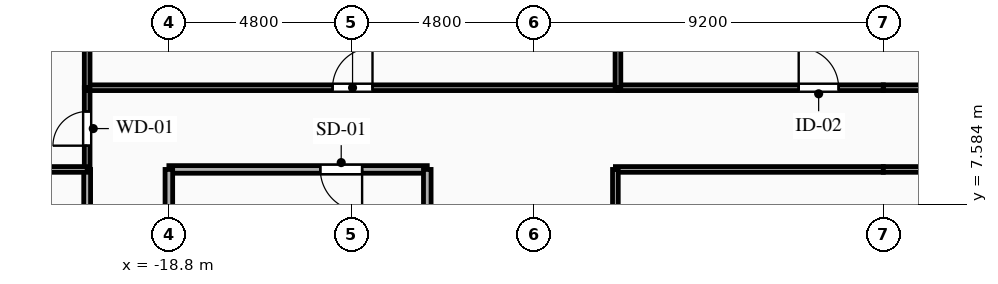
"""IFC4 building model, lengths in metres.
Left out: names, types, materials, properties, quantities, classifications, styles, units other than length and angle.
Written with IfcOpenShell. Run it as: python <this file> out.ifc"""

import sys

from ifc_helpers import new_model, si_unit, direction, frame, frame_2d, origin, place, context, subcontext, project, spatial, rectangle, extrude, element, fill, save


model = new_model("IFC4")
c1 = context("Model", 3, precision=1e-05, world=origin(), true_north=direction((0.0, 1.0)))
c2 = subcontext(c1, "Body", "Model", "MODEL_VIEW")
j1 = project(units=[si_unit("LENGTHUNIT", "METRE"), si_unit("PLANEANGLEUNIT", "RADIAN")], contexts=[c1])
p1 = place(None, origin())
s1 = spatial("IfcSite", under=j1, at=p1, CompositionType="ELEMENT")
p2 = place(p1, origin())
s2 = spatial("IfcBuilding", under=s1, at=p2, CompositionType="ELEMENT")
p3 = place(p2, frame((0.0, 0.0, 151.1)))
s3 = spatial("IfcBuildingStorey", under=s2, at=p3, CompositionType="ELEMENT", Elevation=151.1)
p4 = place(p3, frame((-12.0, 8.5, 0.0), z_axis=(0.0, 0.0, 1.0), x_axis=(-1.0, 0.0, 0.0)))
e1 = element("IfcWall", 1, at=p4, inside=s3, PredefinedType="PARTITIONING", context=c2, shape_type="SweptSolid", body=[
    extrude(rectangle(XDim=6.8, YDim=0.2, at=frame_2d((3.4, 0.0))), origin(), (0.0, 0.0, 1.0), 3.04),
])
p5 = place(p4, frame((1.715, 0.0, 0.0)))
e2 = element("IfcOpeningElement", 2, at=p5, cuts=e1, PredefinedType="OPENING", context=c2, shape_type="SweptSolid", body=[
    extrude(rectangle(XDim=1.1, YDim=2.15, at=frame_2d((0.55, 1.075))), frame((0.0, 0.11, 0.0), z_axis=(0.0, -1.0, 0.0), x_axis=(1.0, 0.0, 0.0)), (0.0, 0.0, 1.0), 0.22),
])
p6 = place(p3, frame((-18.8, 8.5, 0.0), z_axis=(0.0, 0.0, 1.0), x_axis=(0.0, -1.0, 0.0)))
e3 = element("IfcWall", 3, at=p6, inside=s3, PredefinedType="PARTITIONING", context=c2, shape_type="SweptSolid", body=[
    extrude(rectangle(XDim=2.9, YDim=0.2, at=frame_2d((1.45, 0.0))), origin(), (0.0, 0.0, 1.0), 2.525),
])
p7 = place(p3, frame((-12.0, 5.6, 0.0), z_axis=(0.0, 0.0, 1.0), x_axis=(0.0, 1.0, 0.0)))
e4 = element("IfcWall", 4, at=p7, inside=s3, PredefinedType="PARTITIONING", context=c2, shape_type="SweptSolid", body=[
    extrude(rectangle(XDim=2.9, YDim=0.2, at=frame_2d((1.45, 0.0))), origin(), (0.0, 0.0, 1.0), 3.04),
])
p8 = place(p3, frame((-20.95, 8.5, 0.0), z_axis=(0.0, 0.0, 1.0), x_axis=(0.0, 1.0, 0.0)))
e5 = element("IfcWall", 5, at=p8, inside=s3, PredefinedType="PARTITIONING", context=c2, shape_type="SweptSolid", body=[
    extrude(rectangle(XDim=2.15, YDim=0.15, at=frame_2d((1.075, 0.0))), origin(), (0.0, 0.0, 1.0), 3.04),
])
p9 = place(p8, frame((0.625, 0.0, 0.0)))
e6 = element("IfcOpeningElement", 6, at=p9, cuts=e5, PredefinedType="OPENING", context=c2, shape_type="SweptSolid", body=[
    extrude(rectangle(XDim=0.9, YDim=2.1, at=frame_2d((0.45, 1.05))), frame((0.0, 0.085, 0.0), z_axis=(0.0, -1.0, 0.0), x_axis=(1.0, 0.0, 0.0)), (0.0, 0.0, 1.0), 0.17),
])
p10 = place(p3, frame((-20.95, 10.65, 0.0), z_axis=(0.0, 0.0, 1.0), x_axis=(1.0, 0.0, 0.0)))
e7 = element("IfcWall", 7, at=p10, inside=s3, PredefinedType="PARTITIONING", context=c2, shape_type="SweptSolid", body=[
    extrude(rectangle(XDim=13.967, YDim=0.15, at=frame_2d((6.983, 0.0))), origin(), (0.0, 0.0, 1.0), 3.04),
])
p11 = place(p10, frame((6.458, 0.0, 0.0)))
e8 = element("IfcOpeningElement", 8, at=p11, cuts=e7, PredefinedType="OPENING", context=c2, shape_type="SweptSolid", body=[
    extrude(rectangle(XDim=1.05, YDim=2.15, at=frame_2d((0.525, 1.075))), frame((0.0, 0.085, 0.0), z_axis=(0.0, -1.0, 0.0), x_axis=(1.0, 0.0, 0.0)), (0.0, 0.0, 1.0), 0.17),
])
p12 = place(p3, frame((-6.983, 10.65, 0.0), z_axis=(0.0, 0.0, 1.0), x_axis=(1.0, 0.0, 0.0)))
e9 = element("IfcWall", 9, at=p12, inside=s3, PredefinedType="PARTITIONING", context=c2, shape_type="SweptSolid", body=[
    extrude(rectangle(XDim=6.983, YDim=0.15, at=frame_2d((3.491, 0.0))), origin(), (0.0, 0.0, 1.0), 3.04),
])
p13 = place(p12, frame((4.756, 0.0, 0.0)))
e10 = element("IfcOpeningElement", 10, at=p13, cuts=e9, PredefinedType="OPENING", context=c2, shape_type="SweptSolid", body=[
    extrude(rectangle(XDim=1.05, YDim=2.15, at=frame_2d((0.525, 1.075))), frame((0.0, 0.085, 0.0), z_axis=(0.0, -1.0, 0.0), x_axis=(1.0, 0.0, 0.0)), (0.0, 0.0, 1.0), 0.17),
])
p14 = place(p3, frame((0.0, 8.5, 0.0), z_axis=(0.0, 0.0, 1.0), x_axis=(-1.0, 0.0, 0.0)))
e11 = element("IfcWall", 11, at=p14, inside=s3, PredefinedType="PARTITIONING", context=c2, shape_type="SweptSolid", body=[
    extrude(rectangle(XDim=7.05, YDim=0.15, at=frame_2d((3.525, 0.0))), origin(), (0.0, 0.0, 1.0), 3.04),
])
p15 = place(p3, frame((0.0, 10.65, 0.0), z_axis=(0.0, 0.0, 1.0), x_axis=(1.0, 0.0, 0.0)))
e12 = element("IfcWall", 12, at=p15, inside=s3, PredefinedType="PARTITIONING", context=c2, shape_type="SweptSolid", body=[
    extrude(rectangle(XDim=6.983, YDim=0.15, at=frame_2d((3.491, 0.0))), origin(), (0.0, 0.0, 1.0), 3.04),
])
p16 = place(p3, frame((7.05, 8.5, 0.0), z_axis=(0.0, 0.0, 1.0), x_axis=(-1.0, 0.0, 0.0)))
e13 = element("IfcWall", 13, at=p16, inside=s3, PredefinedType="PARTITIONING", context=c2, shape_type="SweptSolid", body=[
    extrude(rectangle(XDim=7.05, YDim=0.15, at=frame_2d((3.525, 0.0))), origin(), (0.0, 0.0, 1.0), 3.04),
])
p17 = place(p3, frame((-20.95, -5.6, 0.0), z_axis=(0.0, 0.0, 1.0), x_axis=(0.0, 1.0, 0.0)))
e14 = element("IfcWall", 14, at=p17, inside=s3, PredefinedType="PARTITIONING", context=c2, shape_type="SweptSolid", body=[
    extrude(rectangle(XDim=14.1, YDim=0.18, at=frame_2d((7.05, 0.0))), origin(), (0.0, 0.0, 1.0), 3.04),
])
p18 = place(p17, frame((5.058, 0.0, 0.0)))
e15 = element("IfcOpeningElement", 15, at=p18, cuts=e14, PredefinedType="OPENING", context=c2, shape_type="SweptSolid", body=[
    extrude(rectangle(XDim=1.0, YDim=2.15, at=frame_2d((0.5, 1.075))), frame((0.0, 0.1, 0.0), z_axis=(0.0, -1.0, 0.0), x_axis=(1.0, 0.0, 0.0)), (0.0, 0.0, 1.0), 0.2),
])
p19 = place(p3, frame((-7.05, 8.5, 0.0), z_axis=(0.0, 0.0, 1.0), x_axis=(0.0, -1.0, 0.0)))
e16 = element("IfcWall", 16, at=p19, inside=s3, PredefinedType="PARTITIONING", context=c2, shape_type="SweptSolid", body=[
    extrude(rectangle(XDim=9.3, YDim=0.15, at=frame_2d((4.65, 0.0))), origin(), (0.0, 0.0, 1.0), 3.04),
])
p20 = place(p3, frame((-23.6, 8.5, 0.0), z_axis=(0.0, 0.0, 1.0), x_axis=(1.0, 0.0, 0.0)))
e17 = element("IfcWall", 17, at=p20, inside=s3, PredefinedType="PARTITIONING", context=c2, shape_type="SweptSolid", body=[
    extrude(rectangle(XDim=2.65, YDim=0.15, at=frame_2d((1.325, 0.0))), origin(), (0.0, 0.0, 1.0), 3.04),
])
p21 = place(p20, frame((0.635, 0.0, 0.0)))
e18 = element("IfcOpeningElement", 18, at=p21, cuts=e17, PredefinedType="OPENING", context=c2, shape_type="SweptSolid", body=[
    extrude(rectangle(XDim=1.05, YDim=2.15, at=frame_2d((0.525, 1.075))), frame((0.0, 0.085, 0.0), z_axis=(0.0, -1.0, 0.0), x_axis=(1.0, 0.0, 0.0)), (0.0, 0.0, 1.0), 0.17),
])
for number, where, z_axis, x_axis in (
    (19, (-20.95, 20.4, 0.0), (0.0, 0.0, 1.0), (0.0, -1.0, 0.0)),
    (20, (-6.983, 20.4, 0.0), (0.0, 0.0, 1.0), (0.0, -1.0, 0.0)),
):
    element("IfcWall", number, at=place(p3, frame(where, z_axis=z_axis, x_axis=x_axis)), inside=s3, PredefinedType="PARTITIONING", context=c2, shape_type="SweptSolid", body=[
        extrude(rectangle(XDim=9.75, YDim=0.15, at=frame_2d((4.875, 0.0))), origin(), (0.0, 0.0, 1.0), 3.04),
    ])
p22 = place(p5, origin())
e21 = element("IfcDoor", 21, at=p22, inside=s3, OperationType="SINGLE_SWING_LEFT", PredefinedType="DOOR", context=c2, shape_type="SweptSolid", body=[
    extrude(rectangle(XDim=1.1, YDim=2.15, at=frame_2d((0.55, 1.075))), frame((0.0, 0.025, 0.0), z_axis=(0.0, -1.0, 0.0), x_axis=(1.0, 0.0, 0.0)), (0.0, 0.0, 1.0), 0.05),
])
fill(e2, e21)
p23 = place(p9, origin())
e22 = element("IfcDoor", 22, at=p23, inside=s3, OperationType="SINGLE_SWING_LEFT", PredefinedType="DOOR", context=c2, shape_type="SweptSolid", body=[
    extrude(rectangle(XDim=0.9, YDim=2.1, at=frame_2d((0.45, 1.05))), frame((0.0, 0.025, 0.0), z_axis=(0.0, -1.0, 0.0), x_axis=(1.0, 0.0, 0.0)), (0.0, 0.0, 1.0), 0.05),
])
fill(e6, e22)
p24 = place(p11, origin())
e23 = element("IfcDoor", 23, at=p24, inside=s3, OperationType="SINGLE_SWING_RIGHT", PredefinedType="DOOR", context=c2, shape_type="SweptSolid", body=[
    extrude(rectangle(XDim=1.05, YDim=2.15, at=frame_2d((0.525, 1.075))), frame((0.0, 0.025, 0.0), z_axis=(0.0, -1.0, 0.0), x_axis=(1.0, 0.0, 0.0)), (0.0, 0.0, 1.0), 0.05),
])
fill(e8, e23)
p25 = place(p13, origin())
e24 = element("IfcDoor", 24, at=p25, inside=s3, OperationType="SINGLE_SWING_LEFT", PredefinedType="DOOR", context=c2, shape_type="SweptSolid", body=[
    extrude(rectangle(XDim=1.05, YDim=2.15, at=frame_2d((0.525, 1.075))), frame((0.0, 0.025, 0.0), z_axis=(0.0, -1.0, 0.0), x_axis=(1.0, 0.0, 0.0)), (0.0, 0.0, 1.0), 0.05),
])
fill(e10, e24)
save(model, sys.argv[1])
